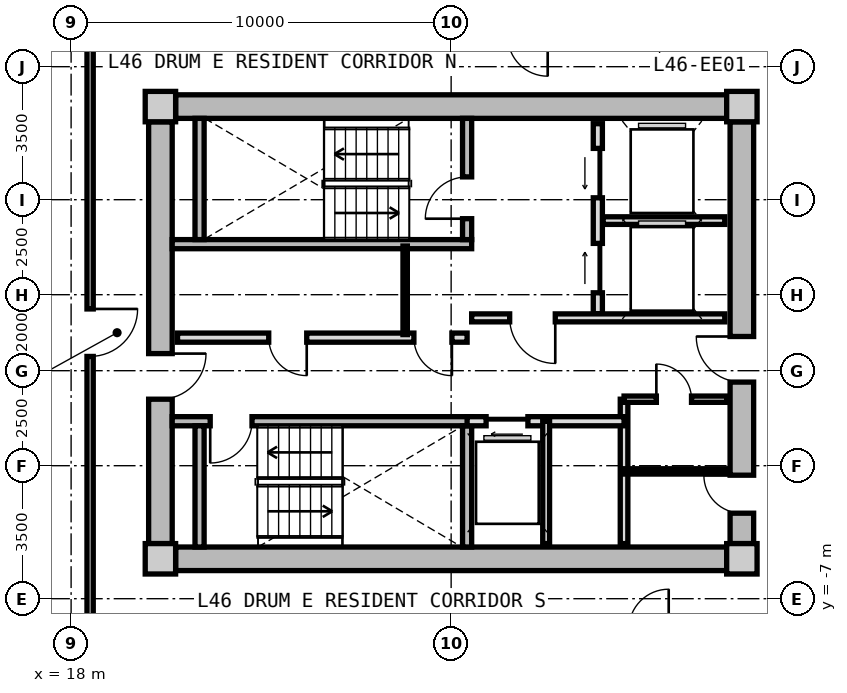
"""IFC4 building model, lengths in metres.
Left out: names, types, materials, properties, quantities, classifications, styles, units other than length and angle.
Written with IfcOpenShell. Run it as: python <this file> out.ifc"""

import sys

from ifc_helpers import new_model, si_unit, direction, frame, frame_2d, origin, origin_2d, place, context, subcontext, project, spatial, rectangle, extrude, source, transform, mapped, element, fill, save


model = new_model("IFC4")
c1 = context("Model", 3, precision=1e-05, world=origin(), true_north=direction((0.0, 1.0)))
c2 = subcontext(c1, "Body", "Model", "MODEL_VIEW")
j1 = project(units=[si_unit("LENGTHUNIT", "METRE"), si_unit("PLANEANGLEUNIT", "RADIAN")], contexts=[c1])
p1 = place(None, origin())
s1 = spatial("IfcSite", under=j1, at=p1, CompositionType="ELEMENT")
p2 = place(p1, origin())
s2 = spatial("IfcBuilding", under=s1, at=p2, CompositionType="ELEMENT")
p3 = place(p2, frame((0.0, 0.0, 149.55)))
s3 = spatial("IfcBuildingStorey", under=s2, at=p3, CompositionType="ELEMENT", Elevation=149.55)
m1 = source(origin(), c2, "Body", "SweptSolid", [
    extrude(rectangle(XDim=0.8, YDim=0.8, at=origin_2d()), origin(), (0.0, 0.0, 1.0), 3.05),
])
for number, where, z_axis, x_axis in (
    (1, (20.35, -5.95, 0.0), (0.0, 0.0, 1.0), (1.0, 0.0, 0.0)),
    (2, (35.65, -5.95, 0.0), (0.0, 0.0, 1.0), (1.0, 0.0, 0.0)),
    (3, (35.65, 5.95, 0.0), (0.0, 0.0, 1.0), (1.0, 0.0, 0.0)),
    (4, (20.35, 5.95, 0.0), (0.0, 0.0, 1.0), (1.0, 0.0, 0.0)),
):
    element("IfcColumn", number, at=place(p3, frame(where, z_axis=z_axis, x_axis=x_axis)), inside=s3, PredefinedType="COLUMN", context=c2, shape_type="MappedRepresentation", body=[
        mapped(m1, transform((0.0, 0.0, 0.0), x_axis=(1.0, 0.0, 0.0), y_axis=(0.0, 1.0, 0.0), z_axis=(0.0, 0.0, 1.0), scale=1.0)),
    ])
m2 = source(origin(), c2, "Body", "SweptSolid", [
    extrude(rectangle(XDim=14.5, YDim=0.62, at=frame_2d((7.25, 0.0))), origin(), (0.0, 0.0, 1.0), 2.81),
])
for number, where, z_axis, x_axis in (
    (5, (20.75, 5.95, 0.0), (0.0, 0.0, 1.0), (1.0, 0.0, 0.0)),
    (6, (35.25, -5.95, 0.0), (0.0, 0.0, 1.0), (-1.0, 0.0, 0.0)),
):
    element("IfcWall", number, at=place(p3, frame(where, z_axis=z_axis, x_axis=x_axis)), inside=s3, PredefinedType="SHEAR", context=c2, shape_type="MappedRepresentation", body=[
        mapped(m2, transform((0.0, 0.0, 0.0), x_axis=(1.0, 0.0, 0.0), y_axis=(0.0, 1.0, 0.0), z_axis=(0.0, 0.0, 1.0), scale=1.0)),
    ])
m3 = source(origin(), c2, "Body", "SweptSolid", [
    extrude(rectangle(XDim=11.1, YDim=0.62, at=frame_2d((5.55, 0.0))), origin(), (0.0, 0.0, 1.0), 2.81),
])
p4 = place(p3, frame((20.35, -5.55, 0.0), z_axis=(0.0, 0.0, 1.0), x_axis=(0.0, 1.0, 0.0)))
e7 = element("IfcWall", 7, at=p4, inside=s3, PredefinedType="SHEAR", context=c2, shape_type="MappedRepresentation", body=[
    mapped(m3, transform((0.0, 0.0, 0.0), x_axis=(1.0, 0.0, 0.0), y_axis=(0.0, 1.0, 0.0), z_axis=(0.0, 0.0, 1.0), scale=1.0)),
])
p5 = place(p4, frame((3.8, 0.0, 0.0)))
e8 = element("IfcOpeningElement", 8, at=p5, cuts=e7, PredefinedType="OPENING", context=c2, shape_type="SweptSolid", body=[
    extrude(rectangle(XDim=1.2, YDim=2.15, at=frame_2d((0.6, 1.075))), frame((0.0, 0.32, 0.0), z_axis=(0.0, -1.0, 0.0), x_axis=(1.0, 0.0, 0.0)), (0.0, 0.0, 1.0), 0.64),
])
p6 = place(p3, frame((35.65, 5.55, 0.0), z_axis=(0.0, 0.0, 1.0), x_axis=(0.0, -1.0, 0.0)))
e9 = element("IfcWall", 9, at=p6, inside=s3, PredefinedType="SHEAR", context=c2, shape_type="MappedRepresentation", body=[
    mapped(m3, transform((0.0, 0.0, 0.0), x_axis=(1.0, 0.0, 0.0), y_axis=(0.0, 1.0, 0.0), z_axis=(0.0, 0.0, 1.0), scale=1.0)),
])
p7 = place(p6, frame((5.65, 0.0, 0.0)))
e10 = element("IfcOpeningElement", 10, at=p7, cuts=e9, PredefinedType="OPENING", context=c2, shape_type="SweptSolid", body=[
    extrude(rectangle(XDim=1.2, YDim=2.15, at=frame_2d((0.6, 1.075))), frame((0.0, 0.32, 0.0), z_axis=(0.0, -1.0, 0.0), x_axis=(1.0, 0.0, 0.0)), (0.0, 0.0, 1.0), 0.64),
])
p8 = place(p6, frame((9.3, 0.0, 0.0)))
e11 = element("IfcOpeningElement", 11, at=p8, cuts=e9, PredefinedType="OPENING", context=c2, shape_type="SweptSolid", body=[
    extrude(rectangle(XDim=1.0, YDim=2.1, at=frame_2d((0.5, 1.05))), frame((0.0, 0.32, 0.0), z_axis=(0.0, -1.0, 0.0), x_axis=(1.0, 0.0, 0.0)), (0.0, 0.0, 1.0), 0.64),
])
m4 = source(origin(), c2, "Body", "SweptSolid", [
    extrude(rectangle(XDim=7.88, YDim=0.24, at=frame_2d((3.94, 0.0))), origin(), (0.0, 0.0, 1.0), 2.81),
])
p9 = place(p3, frame((20.66, 2.33, 0.0), z_axis=(0.0, 0.0, 1.0), x_axis=(1.0, 0.0, 0.0)))
e12 = element("IfcWall", 12, at=p9, inside=s3, PredefinedType="PARTITIONING", context=c2, shape_type="MappedRepresentation", body=[
    mapped(m4, transform((0.0, 0.0, 0.0), x_axis=(1.0, 0.0, 0.0), y_axis=(0.0, 1.0, 0.0), z_axis=(0.0, 0.0, 1.0), scale=1.0)),
])
m5 = source(origin(), c2, "Body", "SweptSolid", [
    extrude(rectangle(XDim=3.19, YDim=0.24, at=frame_2d((1.595, 0.0))), origin(), (0.0, 0.0, 1.0), 2.81),
])
p10 = place(p3, frame((21.38, 2.45, 0.0), z_axis=(0.0, 0.0, 1.0), x_axis=(0.0, 1.0, 0.0)))
e13 = element("IfcWall", 13, at=p10, inside=s3, PredefinedType="PARTITIONING", context=c2, shape_type="MappedRepresentation", body=[
    mapped(m5, transform((0.0, 0.0, 0.0), x_axis=(1.0, 0.0, 0.0), y_axis=(0.0, 1.0, 0.0), z_axis=(0.0, 0.0, 1.0), scale=1.0)),
])
p11 = place(p3, frame((28.42, 2.45, 0.0), z_axis=(0.0, 0.0, 1.0), x_axis=(0.0, 1.0, 0.0)))
e14 = element("IfcWall", 14, at=p11, inside=s3, PredefinedType="PARTITIONING", context=c2, shape_type="MappedRepresentation", body=[
    mapped(m5, transform((0.0, 0.0, 0.0), x_axis=(1.0, 0.0, 0.0), y_axis=(0.0, 1.0, 0.0), z_axis=(0.0, 0.0, 1.0), scale=1.0)),
])
p12 = place(p11, frame((0.55, 0.0, 0.0)))
e15 = element("IfcOpeningElement", 15, at=p12, cuts=e14, PredefinedType="OPENING", context=c2, shape_type="SweptSolid", body=[
    extrude(rectangle(XDim=1.1, YDim=2.15, at=frame_2d((0.55, 1.075))), frame((0.0, 0.13, 0.0), z_axis=(0.0, -1.0, 0.0), x_axis=(1.0, 0.0, 0.0)), (0.0, 0.0, 1.0), 0.26),
])
p13 = place(p3, frame((20.66, -2.33, 0.0), z_axis=(0.0, 0.0, 1.0), x_axis=(1.0, 0.0, 0.0)))
e16 = element("IfcWall", 16, at=p13, inside=s3, PredefinedType="PARTITIONING", context=c2, shape_type="MappedRepresentation", body=[
    mapped(m4, transform((0.0, 0.0, 0.0), x_axis=(1.0, 0.0, 0.0), y_axis=(0.0, 1.0, 0.0), z_axis=(0.0, 0.0, 1.0), scale=1.0)),
])
p14 = place(p13, frame((1.0, 0.0, 0.0)))
e17 = element("IfcOpeningElement", 17, at=p14, cuts=e16, PredefinedType="OPENING", context=c2, shape_type="SweptSolid", body=[
    extrude(rectangle(XDim=1.1, YDim=2.15, at=frame_2d((0.55, 1.075))), frame((0.0, 0.13, 0.0), z_axis=(0.0, -1.0, 0.0), x_axis=(1.0, 0.0, 0.0)), (0.0, 0.0, 1.0), 0.26),
])
for number, where, z_axis, x_axis in (
    (18, (21.38, -5.64, 0.0), (0.0, 0.0, 1.0), (0.0, 1.0, 0.0)),
    (19, (28.42, -5.64, 0.0), (0.0, 0.0, 1.0), (0.0, 1.0, 0.0)),
):
    element("IfcWall", number, at=place(p3, frame(where, z_axis=z_axis, x_axis=x_axis)), inside=s3, PredefinedType="PARTITIONING", context=c2, shape_type="MappedRepresentation", body=[
        mapped(m5, transform((0.0, 0.0, 0.0), x_axis=(1.0, 0.0, 0.0), y_axis=(0.0, 1.0, 0.0), z_axis=(0.0, 0.0, 1.0), scale=1.0)),
    ])
m6 = source(origin(), c2, "Body", "SweptSolid", [
    extrude(rectangle(XDim=5.0, YDim=0.24, at=frame_2d((2.5, 0.0))), origin(), (0.0, 0.0, 1.0), 2.795),
])
p15 = place(p3, frame((31.86, 0.5, 0.0), z_axis=(0.0, 0.0, 1.0), x_axis=(0.0, 1.0, 0.0)))
e20 = element("IfcWall", 20, at=p15, inside=s3, PredefinedType="PARTITIONING", context=c2, shape_type="MappedRepresentation", body=[
    mapped(m6, transform((0.0, 0.0, 0.0), x_axis=(1.0, 0.0, 0.0), y_axis=(0.0, 1.0, 0.0), z_axis=(0.0, 0.0, 1.0), scale=1.0)),
])
p16 = place(p15, frame((3.05, 0.0, 0.0)))
e21 = element("IfcOpeningElement", 21, at=p16, cuts=e20, PredefinedType="OPENING", context=c2, shape_type="SweptSolid", body=[
    extrude(rectangle(XDim=1.3, YDim=2.2, at=frame_2d((0.65, 1.1))), frame((0.0, 0.13, 0.0), z_axis=(0.0, -1.0, 0.0), x_axis=(1.0, 0.0, 0.0)), (0.0, 0.0, 1.0), 0.26),
])
p17 = place(p15, frame((0.55, 0.0, 0.0)))
e22 = element("IfcOpeningElement", 22, at=p17, cuts=e20, PredefinedType="OPENING", context=c2, shape_type="SweptSolid", body=[
    extrude(rectangle(XDim=1.3, YDim=2.2, at=frame_2d((0.65, 1.1))), frame((0.0, 0.13, 0.0), z_axis=(0.0, -1.0, 0.0), x_axis=(1.0, 0.0, 0.0)), (0.0, 0.0, 1.0), 0.26),
])
m7 = source(origin(), c2, "Body", "SweptSolid", [
    extrude(rectangle(XDim=3.2, YDim=0.2, at=frame_2d((1.6, 0.0))), origin(), (0.0, 0.0, 1.0), 2.795),
])
p18 = place(p3, frame((32.0, 2.95, 0.0), z_axis=(0.0, 0.0, 1.0), x_axis=(1.0, 0.0, 0.0)))
e23 = element("IfcWall", 23, at=p18, inside=s3, PredefinedType="PARTITIONING", context=c2, shape_type="MappedRepresentation", body=[
    mapped(m7, transform((0.0, 0.0, 0.0), x_axis=(1.0, 0.0, 0.0), y_axis=(0.0, 1.0, 0.0), z_axis=(0.0, 0.0, 1.0), scale=1.0)),
])
m8 = source(origin(), c2, "Body", "SweptSolid", [
    extrude(rectangle(XDim=6.66, YDim=0.21, at=frame_2d((3.33, 0.0))), origin(), (0.0, 0.0, 1.0), 2.795),
])
p19 = place(p3, frame((28.54, 0.39, 0.0), z_axis=(0.0, 0.0, 1.0), x_axis=(1.0, 0.0, 0.0)))
e24 = element("IfcWall", 24, at=p19, inside=s3, PredefinedType="PARTITIONING", context=c2, shape_type="MappedRepresentation", body=[
    mapped(m8, transform((0.0, 0.0, 0.0), x_axis=(1.0, 0.0, 0.0), y_axis=(0.0, 1.0, 0.0), z_axis=(0.0, 0.0, 1.0), scale=1.0)),
])
p20 = place(p19, frame((1.0, 0.0, 0.0)))
e25 = element("IfcOpeningElement", 25, at=p20, cuts=e24, PredefinedType="OPENING", context=c2, shape_type="SweptSolid", body=[
    extrude(rectangle(XDim=1.2, YDim=2.15, at=frame_2d((0.6, 1.075))), frame((0.0, 0.115, 0.0), z_axis=(0.0, -1.0, 0.0), x_axis=(1.0, 0.0, 0.0)), (0.0, 0.0, 1.0), 0.23),
])
m9 = source(origin(), c2, "Body", "SweptSolid", [
    extrude(rectangle(XDim=7.62, YDim=0.24, at=frame_2d((3.81, 0.0))), origin(), (0.0, 0.0, 1.0), 2.795),
])
p21 = place(p3, frame((20.8, -0.13, 0.0), z_axis=(0.0, 0.0, 1.0), x_axis=(1.0, 0.0, 0.0)))
e26 = element("IfcWall", 26, at=p21, inside=s3, PredefinedType="PARTITIONING", context=c2, shape_type="MappedRepresentation", body=[
    mapped(m9, transform((0.0, 0.0, 0.0), x_axis=(1.0, 0.0, 0.0), y_axis=(0.0, 1.0, 0.0), z_axis=(0.0, 0.0, 1.0), scale=1.0)),
])
p22 = place(p21, frame((6.22, 0.0, 0.0)))
e27 = element("IfcOpeningElement", 27, at=p22, cuts=e26, PredefinedType="OPENING", context=c2, shape_type="SweptSolid", body=[
    extrude(rectangle(XDim=1.0, YDim=2.1, at=frame_2d((0.5, 1.05))), frame((0.0, 0.13, 0.0), z_axis=(0.0, -1.0, 0.0), x_axis=(1.0, 0.0, 0.0)), (0.0, 0.0, 1.0), 0.26),
])
p23 = place(p21, frame((2.4, 0.0, 0.0)))
e28 = element("IfcOpeningElement", 28, at=p23, cuts=e26, PredefinedType="OPENING", context=c2, shape_type="SweptSolid", body=[
    extrude(rectangle(XDim=1.0, YDim=2.1, at=frame_2d((0.5, 1.05))), frame((0.0, 0.13, 0.0), z_axis=(0.0, -1.0, 0.0), x_axis=(1.0, 0.0, 0.0)), (0.0, 0.0, 1.0), 0.26),
])
m10 = source(origin(), c2, "Body", "SweptSolid", [
    extrude(rectangle(XDim=2.33, YDim=0.115, at=frame_2d((1.165, 0.0))), origin(), (0.0, 0.0, 1.0), 2.795),
])
p24 = place(p3, frame((26.79, -0.05, 0.0), z_axis=(0.0, 0.0, 1.0), x_axis=(0.0, 1.0, 0.0)))
e29 = element("IfcWall", 29, at=p24, inside=s3, PredefinedType="PARTITIONING", context=c2, shape_type="MappedRepresentation", body=[
    mapped(m10, transform((0.0, 0.0, 0.0), x_axis=(1.0, 0.0, 0.0), y_axis=(0.0, 1.0, 0.0), z_axis=(0.0, 0.0, 1.0), scale=1.0)),
])
m11 = source(origin(), c2, "Body", "SweptSolid", [
    extrude(rectangle(XDim=3.8, YDim=0.2, at=frame_2d((1.9, 0.0))), origin(), (0.0, 0.0, 1.0), 2.795),
])
p25 = place(p3, frame((32.55, -5.55, 0.0), z_axis=(0.0, 0.0, 1.0), x_axis=(0.0, 1.0, 0.0)))
e30 = element("IfcWall", 30, at=p25, inside=s3, PredefinedType="PARTITIONING", context=c2, shape_type="MappedRepresentation", body=[
    mapped(m11, transform((0.0, 0.0, 0.0), x_axis=(1.0, 0.0, 0.0), y_axis=(0.0, 1.0, 0.0), z_axis=(0.0, 0.0, 1.0), scale=1.0)),
])
m12 = source(origin(), c2, "Body", "SweptSolid", [
    extrude(rectangle(XDim=4.13, YDim=0.24, at=frame_2d((2.065, 0.0))), origin(), (0.0, 0.0, 1.0), 2.795),
])
p26 = place(p3, frame((28.42, -2.33, 0.0), z_axis=(0.0, 0.0, 1.0), x_axis=(1.0, 0.0, 0.0)))
e31 = element("IfcWall", 31, at=p26, inside=s3, PredefinedType="PARTITIONING", context=c2, shape_type="MappedRepresentation", body=[
    mapped(m12, transform((0.0, 0.0, 0.0), x_axis=(1.0, 0.0, 0.0), y_axis=(0.0, 1.0, 0.0), z_axis=(0.0, 0.0, 1.0), scale=1.0)),
])
p27 = place(p26, frame((0.5, 0.0, 0.0)))
e32 = element("IfcOpeningElement", 32, at=p27, cuts=e31, PredefinedType="OPENING", context=c2, shape_type="SweptSolid", body=[
    extrude(rectangle(XDim=1.1, YDim=2.2, at=frame_2d((0.55, 1.1))), frame((0.0, 0.13, 0.0), z_axis=(0.0, -1.0, 0.0), x_axis=(1.0, 0.0, 0.0)), (0.0, 0.0, 1.0), 0.26),
])
m13 = source(origin(), c2, "Body", "SweptSolid", [
    extrude(rectangle(XDim=3.22, YDim=0.18, at=frame_2d((1.61, 0.0))), origin(), (0.0, 0.0, 1.0), 2.795),
])
p28 = place(p3, frame((30.5, -5.55, 0.0), z_axis=(0.0, 0.0, 1.0), x_axis=(0.0, 1.0, 0.0)))
e33 = element("IfcWall", 33, at=p28, inside=s3, PredefinedType="PARTITIONING", context=c2, shape_type="MappedRepresentation", body=[
    mapped(m13, transform((0.0, 0.0, 0.0), x_axis=(1.0, 0.0, 0.0), y_axis=(0.0, 1.0, 0.0), z_axis=(0.0, 0.0, 1.0), scale=1.0)),
])
m14 = source(origin(), c2, "Body", "SweptSolid", [
    extrude(rectangle(XDim=2.7, YDim=0.165, at=frame_2d((1.35, 0.0))), origin(), (0.0, 0.0, 1.0), 2.795),
])
p29 = place(p3, frame((32.55, -1.75, 0.0), z_axis=(0.0, 0.0, 1.0), x_axis=(1.0, 0.0, 0.0)))
e34 = element("IfcWall", 34, at=p29, inside=s3, PredefinedType="PARTITIONING", context=c2, shape_type="MappedRepresentation", body=[
    mapped(m14, transform((0.0, 0.0, 0.0), x_axis=(1.0, 0.0, 0.0), y_axis=(0.0, 1.0, 0.0), z_axis=(0.0, 0.0, 1.0), scale=1.0)),
])
p30 = place(p29, frame((0.85, 0.0, 0.0)))
e35 = element("IfcOpeningElement", 35, at=p30, cuts=e34, PredefinedType="OPENING", context=c2, shape_type="SweptSolid", body=[
    extrude(rectangle(XDim=0.925, YDim=2.1, at=frame_2d((0.462, 1.05))), frame((0.0, 0.093, 0.0), z_axis=(0.0, -1.0, 0.0), x_axis=(1.0, 0.0, 0.0)), (0.0, 0.0, 1.0), 0.185),
])
m15 = source(origin(), c2, "Body", "SweptSolid", [
    extrude(rectangle(XDim=2.7, YDim=0.14, at=frame_2d((1.35, 0.0))), origin(), (0.0, 0.0, 1.0), 2.795),
])
p31 = place(p3, frame((32.55, -3.65, 0.0), z_axis=(0.0, 0.0, 1.0), x_axis=(1.0, 0.0, 0.0)))
e36 = element("IfcWall", 36, at=p31, inside=s3, PredefinedType="PARTITIONING", context=c2, shape_type="MappedRepresentation", body=[
    mapped(m15, transform((0.0, 0.0, 0.0), x_axis=(1.0, 0.0, 0.0), y_axis=(0.0, 1.0, 0.0), z_axis=(0.0, 0.0, 1.0), scale=1.0)),
])
m16 = source(origin(), c2, "Body", "SweptSolid", [
    extrude(rectangle(XDim=15.6, YDim=0.165, at=frame_2d((7.8, 0.0))), origin(), (0.0, 0.0, 1.0), 2.795),
])
p32 = place(p3, frame((18.5, -7.8, 0.0), z_axis=(0.0, 0.0, 1.0), x_axis=(0.0, 1.0, 0.0)))
e37 = element("IfcWall", 37, at=p32, inside=s3, PredefinedType="PARTITIONING", context=c2, shape_type="MappedRepresentation", body=[
    mapped(m16, transform((0.0, 0.0, 0.0), x_axis=(1.0, 0.0, 0.0), y_axis=(0.0, 1.0, 0.0), z_axis=(0.0, 0.0, 1.0), scale=1.0)),
])
p33 = place(p32, frame((7.175, 0.0, 0.0)))
e38 = element("IfcOpeningElement", 38, at=p33, cuts=e37, PredefinedType="OPENING", context=c2, shape_type="SweptSolid", body=[
    extrude(rectangle(XDim=1.25, YDim=2.2, at=frame_2d((0.625, 1.1))), frame((0.0, 0.093, 0.0), z_axis=(0.0, -1.0, 0.0), x_axis=(1.0, 0.0, 0.0)), (0.0, 0.0, 1.0), 0.185),
])
m17 = source(origin(), c2, "Body", "SweptSolid", [
    extrude(rectangle(XDim=1.1, YDim=2.15, at=frame_2d((0.55, 1.075))), frame((0.0, 0.025, 0.0), z_axis=(0.0, -1.0, 0.0), x_axis=(1.0, 0.0, 0.0)), (0.0, 0.0, 1.0), 0.05),
])
p34 = place(p12, origin())
e39 = element("IfcDoor", 39, at=p34, inside=s3, OperationType="SINGLE_SWING_LEFT", PredefinedType="DOOR", context=c2, shape_type="MappedRepresentation", body=[
    mapped(m17, transform((0.0, 0.0, 0.0), x_axis=(1.0, 0.0, 0.0), y_axis=(0.0, 1.0, 0.0), z_axis=(0.0, 0.0, 1.0), scale=1.0)),
])
fill(e15, e39)
p35 = place(p14, frame((1.1, 0.0, 0.0), z_axis=(0.0, 0.0, 1.0), x_axis=(-1.0, 0.0, 0.0)))
e40 = element("IfcDoor", 40, at=p35, inside=s3, OperationType="SINGLE_SWING_RIGHT", PredefinedType="DOOR", context=c2, shape_type="MappedRepresentation", body=[
    mapped(m17, transform((0.0, 0.0, 0.0), x_axis=(1.0, 0.0, 0.0), y_axis=(0.0, 1.0, 0.0), z_axis=(0.0, 0.0, 1.0), scale=1.0)),
])
fill(e17, e40)
m18 = source(origin(), c2, "Body", "SweptSolid", [
    extrude(rectangle(XDim=1.3, YDim=2.2, at=frame_2d((0.65, 1.1))), frame((0.0, 0.025, 0.0), z_axis=(0.0, -1.0, 0.0), x_axis=(1.0, 0.0, 0.0)), (0.0, 0.0, 1.0), 0.05),
])
p36 = place(p16, origin())
e41 = element("IfcDoor", 41, at=p36, inside=s3, OperationType="SLIDING_TO_LEFT", PredefinedType="DOOR", context=c2, shape_type="MappedRepresentation", body=[
    mapped(m18, transform((0.0, 0.0, 0.0), x_axis=(1.0, 0.0, 0.0), y_axis=(0.0, 1.0, 0.0), z_axis=(0.0, 0.0, 1.0), scale=1.0)),
])
fill(e21, e41)
p37 = place(p17, origin())
e42 = element("IfcDoor", 42, at=p37, inside=s3, OperationType="SLIDING_TO_RIGHT", PredefinedType="DOOR", context=c2, shape_type="MappedRepresentation", body=[
    mapped(m18, transform((0.0, 0.0, 0.0), x_axis=(1.0, 0.0, 0.0), y_axis=(0.0, 1.0, 0.0), z_axis=(0.0, 0.0, 1.0), scale=1.0)),
])
fill(e22, e42)
m19 = source(origin(), c2, "Body", "SweptSolid", [
    extrude(rectangle(XDim=1.2, YDim=2.15, at=frame_2d((0.6, 1.075))), frame((0.0, 0.025, 0.0), z_axis=(0.0, -1.0, 0.0), x_axis=(1.0, 0.0, 0.0)), (0.0, 0.0, 1.0), 0.05),
])
p38 = place(p20, frame((1.2, 0.0, 0.0), z_axis=(0.0, 0.0, 1.0), x_axis=(-1.0, 0.0, 0.0)))
e43 = element("IfcDoor", 43, at=p38, inside=s3, OperationType="SINGLE_SWING_LEFT", PredefinedType="DOOR", context=c2, shape_type="MappedRepresentation", body=[
    mapped(m19, transform((0.0, 0.0, 0.0), x_axis=(1.0, 0.0, 0.0), y_axis=(0.0, 1.0, 0.0), z_axis=(0.0, 0.0, 1.0), scale=1.0)),
])
fill(e25, e43)
p39 = place(p5, frame((1.2, 0.0, 0.0), z_axis=(0.0, 0.0, 1.0), x_axis=(-1.0, 0.0, 0.0)))
e44 = element("IfcDoor", 44, at=p39, inside=s3, OperationType="SINGLE_SWING_LEFT", PredefinedType="DOOR", context=c2, shape_type="MappedRepresentation", body=[
    mapped(m19, transform((0.0, 0.0, 0.0), x_axis=(1.0, 0.0, 0.0), y_axis=(0.0, 1.0, 0.0), z_axis=(0.0, 0.0, 1.0), scale=1.0)),
])
fill(e8, e44)
p40 = place(p7, frame((1.2, 0.0, 0.0), z_axis=(0.0, 0.0, 1.0), x_axis=(-1.0, 0.0, 0.0)))
e45 = element("IfcDoor", 45, at=p40, inside=s3, OperationType="SINGLE_SWING_RIGHT", PredefinedType="DOOR", context=c2, shape_type="MappedRepresentation", body=[
    mapped(m19, transform((0.0, 0.0, 0.0), x_axis=(1.0, 0.0, 0.0), y_axis=(0.0, 1.0, 0.0), z_axis=(0.0, 0.0, 1.0), scale=1.0)),
])
fill(e10, e45)
m20 = source(origin(), c2, "Body", "SweptSolid", [
    extrude(rectangle(XDim=1.0, YDim=2.1, at=frame_2d((0.5, 1.05))), frame((0.0, 0.025, 0.0), z_axis=(0.0, -1.0, 0.0), x_axis=(1.0, 0.0, 0.0)), (0.0, 0.0, 1.0), 0.05),
])
p41 = place(p22, frame((1.0, 0.0, 0.0), z_axis=(0.0, 0.0, 1.0), x_axis=(-1.0, 0.0, 0.0)))
e46 = element("IfcDoor", 46, at=p41, inside=s3, OperationType="SINGLE_SWING_LEFT", PredefinedType="DOOR", context=c2, shape_type="MappedRepresentation", body=[
    mapped(m20, transform((0.0, 0.0, 0.0), x_axis=(1.0, 0.0, 0.0), y_axis=(0.0, 1.0, 0.0), z_axis=(0.0, 0.0, 1.0), scale=1.0)),
])
fill(e27, e46)
p42 = place(p23, frame((1.0, 0.0, 0.0), z_axis=(0.0, 0.0, 1.0), x_axis=(-1.0, 0.0, 0.0)))
e47 = element("IfcDoor", 47, at=p42, inside=s3, OperationType="SINGLE_SWING_LEFT", PredefinedType="DOOR", context=c2, shape_type="MappedRepresentation", body=[
    mapped(m20, transform((0.0, 0.0, 0.0), x_axis=(1.0, 0.0, 0.0), y_axis=(0.0, 1.0, 0.0), z_axis=(0.0, 0.0, 1.0), scale=1.0)),
])
fill(e28, e47)
m21 = source(origin(), c2, "Body", "SweptSolid", [
    extrude(rectangle(XDim=1.1, YDim=2.2, at=frame_2d((0.55, 1.1))), frame((0.0, 0.025, 0.0), z_axis=(0.0, -1.0, 0.0), x_axis=(1.0, 0.0, 0.0)), (0.0, 0.0, 1.0), 0.05),
])
p43 = place(p27, frame((1.1, 0.0, 0.0), z_axis=(0.0, 0.0, 1.0), x_axis=(-1.0, 0.0, 0.0)))
e48 = element("IfcDoor", 48, at=p43, inside=s3, OperationType="SLIDING_TO_LEFT", PredefinedType="DOOR", context=c2, shape_type="MappedRepresentation", body=[
    mapped(m21, transform((0.0, 0.0, 0.0), x_axis=(1.0, 0.0, 0.0), y_axis=(0.0, 1.0, 0.0), z_axis=(0.0, 0.0, 1.0), scale=1.0)),
])
fill(e32, e48)
m22 = source(origin(), c2, "Body", "SweptSolid", [
    extrude(rectangle(XDim=0.925, YDim=2.1, at=frame_2d((0.462, 1.05))), frame((0.0, 0.025, 0.0), z_axis=(0.0, -1.0, 0.0), x_axis=(1.0, 0.0, 0.0)), (0.0, 0.0, 1.0), 0.05),
])
p44 = place(p30, origin())
e49 = element("IfcDoor", 49, at=p44, inside=s3, OperationType="SINGLE_SWING_LEFT", PredefinedType="DOOR", context=c2, shape_type="MappedRepresentation", body=[
    mapped(m22, transform((0.0, 0.0, 0.0), x_axis=(1.0, 0.0, 0.0), y_axis=(0.0, 1.0, 0.0), z_axis=(0.0, 0.0, 1.0), scale=1.0)),
])
fill(e35, e49)
p45 = place(p8, frame((1.0, 0.0, 0.0), z_axis=(0.0, 0.0, 1.0), x_axis=(-1.0, 0.0, 0.0)))
e50 = element("IfcDoor", 50, at=p45, inside=s3, OperationType="SINGLE_SWING_RIGHT", PredefinedType="DOOR", context=c2, shape_type="MappedRepresentation", body=[
    mapped(m20, transform((0.0, 0.0, 0.0), x_axis=(1.0, 0.0, 0.0), y_axis=(0.0, 1.0, 0.0), z_axis=(0.0, 0.0, 1.0), scale=1.0)),
])
fill(e11, e50)
m23 = source(origin(), c2, "Body", "SweptSolid", [
    extrude(rectangle(XDim=1.25, YDim=2.2, at=frame_2d((0.625, 1.1))), frame((0.0, 0.025, 0.0), z_axis=(0.0, -1.0, 0.0), x_axis=(1.0, 0.0, 0.0)), (0.0, 0.0, 1.0), 0.05),
])
p46 = place(p33, frame((1.25, 0.0, 0.0), z_axis=(0.0, 0.0, 1.0), x_axis=(-1.0, 0.0, 0.0)))
e51 = element("IfcDoor", 51, at=p46, inside=s3, OperationType="SINGLE_SWING_LEFT", PredefinedType="DOOR", context=c2, shape_type="MappedRepresentation", body=[
    mapped(m23, transform((0.0, 0.0, 0.0), x_axis=(1.0, 0.0, 0.0), y_axis=(0.0, 1.0, 0.0), z_axis=(0.0, 0.0, 1.0), scale=1.0)),
])
fill(e38, e51)
save(model, sys.argv[1])
